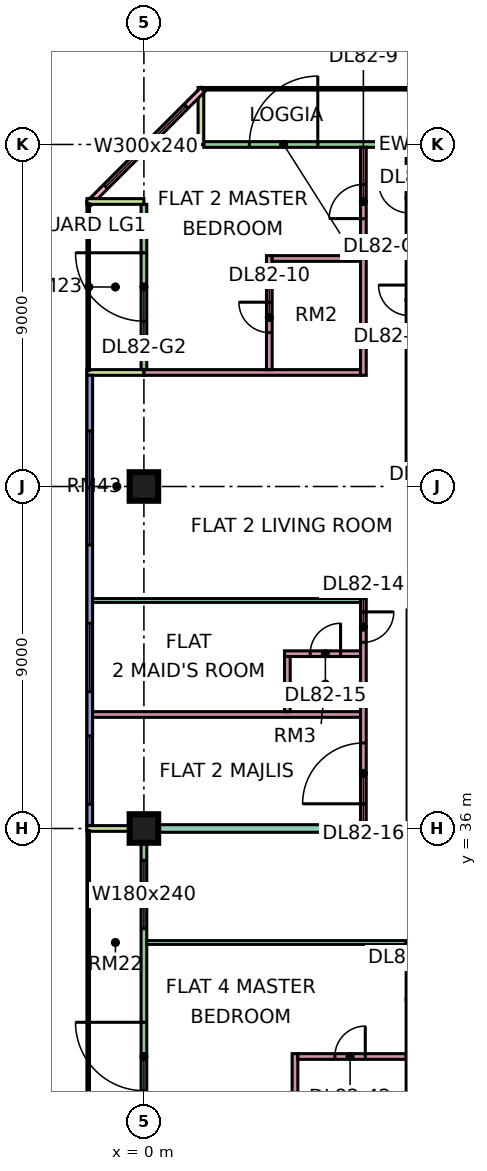
"""IFC4 building model, lengths in metres.
Left out: names, types, materials, properties, quantities, classifications, styles, units other than length and angle.
Written with IfcOpenShell. Run it as: python <this file> out.ifc"""

import sys

from ifc_helpers import new_model, si_unit, direction, frame, frame_2d, origin, origin_2d, place, context, subcontext, project, spatial, rectangle, extrude, element, fill, save


model = new_model("IFC4")
c1 = context("Model", 3, precision=1e-05, world=origin(), true_north=direction((0.0, 1.0)))
c2 = subcontext(c1, "Body", "Model", "MODEL_VIEW")
j1 = project(units=[si_unit("LENGTHUNIT", "METRE"), si_unit("PLANEANGLEUNIT", "RADIAN")], contexts=[c1])
p1 = place(None, origin())
s1 = spatial("IfcSite", under=j1, at=p1, CompositionType="ELEMENT")
p2 = place(p1, origin())
s2 = spatial("IfcBuilding", under=s1, at=p2, CompositionType="ELEMENT")
p3 = place(p2, frame((0.0, 0.0, 353.9)))
s3 = spatial("IfcBuildingStorey", under=s2, at=p3, CompositionType="ELEMENT", Elevation=353.9)
p4 = place(p3, frame((0.0, 36.0, 0.0), z_axis=(0.0, 0.0, 1.0), x_axis=(1.0, 0.0, 0.0)))
e1 = element("IfcColumn", 1, at=p4, inside=s3, PredefinedType="COLUMN", context=c2, shape_type="SweptSolid", body=[
    extrude(rectangle(XDim=0.75, YDim=0.75, at=origin_2d()), origin(), (0.0, 0.0, 1.0), 3.75),
])
p5 = place(p3, frame((0.0, 45.0, 0.0), z_axis=(0.0, 0.0, 1.0), x_axis=(1.0, 0.0, 0.0)))
e2 = element("IfcColumn", 2, at=p5, inside=s3, PredefinedType="COLUMN", context=c2, shape_type="SweptSolid", body=[
    extrude(rectangle(XDim=0.75, YDim=0.75, at=origin_2d()), origin(), (0.0, 0.0, 1.0), 3.75),
])
p6 = place(p3, frame((11.925, 54.0, 0.0), z_axis=(0.0, 0.0, 1.0), x_axis=(-1.0, 0.0, 0.0)))
e3 = element("IfcWall", 3, at=p6, inside=s3, PredefinedType="SOLIDWALL", context=c2, shape_type="SweptSolid", body=[
    extrude(rectangle(XDim=10.35, YDim=0.15, at=frame_2d((5.175, 0.0))), origin(), (0.0, 0.0, 1.0), 3.35),
])
p7 = place(p6, frame((2.075, 0.0, 1.7)))
e4 = element("IfcOpeningElement", 4, at=p7, cuts=e3, PredefinedType="OPENING", context=c2, shape_type="SweptSolid", body=[
    extrude(rectangle(XDim=1.2, YDim=0.9, at=frame_2d((0.6, 0.45))), frame((0.0, 0.085, 0.0), z_axis=(0.0, -1.0, 0.0), x_axis=(1.0, 0.0, 0.0)), (0.0, 0.0, 1.0), 0.17),
])
p8 = place(p6, frame((7.35, 0.0, 0.0)))
e5 = element("IfcOpeningElement", 5, at=p8, cuts=e3, PredefinedType="OPENING", context=c2, shape_type="SweptSolid", body=[
    extrude(rectangle(XDim=1.8, YDim=2.4, at=frame_2d((0.9, 1.2))), frame((0.0, 0.085, 0.0), z_axis=(0.0, -1.0, 0.0), x_axis=(1.0, 0.0, 0.0)), (0.0, 0.0, 1.0), 0.17),
])
p9 = place(p3, frame((1.5, 55.5, 0.0), z_axis=(0.0, 0.0, 1.0), x_axis=(0.0, -1.0, 0.0)))
e6 = element("IfcWall", 6, at=p9, inside=s3, PredefinedType="SOLIDWALL", context=c2, shape_type="SweptSolid", body=[
    extrude(rectangle(XDim=1.5, YDim=0.15, at=frame_2d((0.75, 0.0))), origin(), (0.0, 0.0, 1.0), 3.35),
])
p10 = place(p3, frame((1.553, 55.447, 0.0), z_axis=(0.0, 0.0, 1.0), x_axis=(-0.707106781187, -0.707106781187, 0.0)))
e7 = element("IfcWall", 7, at=p10, inside=s3, PredefinedType="SOLIDWALL", context=c2, shape_type="SweptSolid", body=[
    extrude(rectangle(XDim=4.243, YDim=0.15, at=frame_2d((2.121, 0.0))), origin(), (0.0, 0.0, 1.0), 3.35),
])
p11 = place(p10, frame((0.621, 0.0, 0.45)))
e8 = element("IfcOpeningElement", 8, at=p11, cuts=e7, PredefinedType="OPENING", context=c2, shape_type="SweptSolid", body=[
    extrude(rectangle(XDim=3.0, YDim=2.4, at=frame_2d((1.5, 1.2))), frame((0.0, 0.085, 0.0), z_axis=(0.0, -1.0, 0.0), x_axis=(1.0, 0.0, 0.0)), (0.0, 0.0, 1.0), 0.17),
])
p12 = place(p3, frame((0.0, 52.425, 0.0), z_axis=(0.0, 0.0, 1.0), x_axis=(0.0, -1.0, 0.0)))
e9 = element("IfcWall", 9, at=p12, inside=s3, PredefinedType="SOLIDWALL", context=c2, shape_type="SweptSolid", body=[
    extrude(rectangle(XDim=4.35, YDim=0.15, at=frame_2d((2.175, 0.0))), origin(), (0.0, 0.0, 1.0), 3.35),
])
p13 = place(p12, frame((1.275, 0.0, 0.0)))
e10 = element("IfcOpeningElement", 10, at=p13, cuts=e9, PredefinedType="OPENING", context=c2, shape_type="SweptSolid", body=[
    extrude(rectangle(XDim=1.8, YDim=2.4, at=frame_2d((0.9, 1.2))), frame((0.0, 0.085, 0.0), z_axis=(0.0, -1.0, 0.0), x_axis=(1.0, 0.0, 0.0)), (0.0, 0.0, 1.0), 0.17),
])
for number, where, z_axis, x_axis in (
    (11, (-1.5, 52.5, 0.0), (0.0, 0.0, 1.0), (1.0, 0.0, 0.0)),
    (12, (-1.5, 48.0, 0.0), (0.0, 0.0, 1.0), (1.0, 0.0, 0.0)),
):
    element("IfcWall", number, at=place(p3, frame(where, z_axis=z_axis, x_axis=x_axis)), inside=s3, PredefinedType="SOLIDWALL", context=c2, shape_type="SweptSolid", body=[
        extrude(rectangle(XDim=1.5, YDim=0.15, at=frame_2d((0.75, 0.0))), origin(), (0.0, 0.0, 1.0), 3.35),
    ])
p14 = place(p3, frame((-1.425, 47.925, 0.0), z_axis=(0.0, 0.0, 1.0), x_axis=(0.0, -1.0, 0.0)))
e13 = element("IfcWall", 13, at=p14, inside=s3, PredefinedType="SOLIDWALL", context=c2, shape_type="SweptSolid", body=[
    extrude(rectangle(XDim=11.85, YDim=0.15, at=frame_2d((5.925, 0.0))), origin(), (0.0, 0.0, 1.0), 3.35),
])
p15 = place(p14, frame((1.462, 0.0, 0.45)))
e14 = element("IfcOpeningElement", 14, at=p15, cuts=e13, PredefinedType="OPENING", context=c2, shape_type="SweptSolid", body=[
    extrude(rectangle(XDim=3.0, YDim=2.4, at=frame_2d((1.5, 1.2))), frame((0.0, 0.085, 0.0), z_axis=(0.0, -1.0, 0.0), x_axis=(1.0, 0.0, 0.0)), (0.0, 0.0, 1.0), 0.17),
])
p16 = place(p14, frame((6.525, 0.0, 0.45)))
e15 = element("IfcOpeningElement", 15, at=p16, cuts=e13, PredefinedType="OPENING", context=c2, shape_type="SweptSolid", body=[
    extrude(rectangle(XDim=1.8, YDim=2.4, at=frame_2d((0.9, 1.2))), frame((0.0, 0.085, 0.0), z_axis=(0.0, -1.0, 0.0), x_axis=(1.0, 0.0, 0.0)), (0.0, 0.0, 1.0), 0.17),
])
p17 = place(p14, frame((9.488, 0.0, 0.45)))
e16 = element("IfcOpeningElement", 16, at=p17, cuts=e13, PredefinedType="OPENING", context=c2, shape_type="SweptSolid", body=[
    extrude(rectangle(XDim=1.8, YDim=2.4, at=frame_2d((0.9, 1.2))), frame((0.0, 0.085, 0.0), z_axis=(0.0, -1.0, 0.0), x_axis=(1.0, 0.0, 0.0)), (0.0, 0.0, 1.0), 0.17),
])
p18 = place(p3, frame((0.0, 35.925, 0.0), z_axis=(0.0, 0.0, 1.0), x_axis=(0.0, -1.0, 0.0)))
e17 = element("IfcWall", 17, at=p18, inside=s3, PredefinedType="SOLIDWALL", context=c2, shape_type="SweptSolid", body=[
    extrude(rectangle(XDim=11.85, YDim=0.15, at=frame_2d((5.925, 0.0))), origin(), (0.0, 0.0, 1.0), 3.35),
])
p19 = place(p18, frame((0.762, 0.0, 0.45)))
e18 = element("IfcOpeningElement", 18, at=p19, cuts=e17, PredefinedType="OPENING", context=c2, shape_type="SweptSolid", body=[
    extrude(rectangle(XDim=1.8, YDim=2.4, at=frame_2d((0.9, 1.2))), frame((0.0, 0.085, 0.0), z_axis=(0.0, -1.0, 0.0), x_axis=(1.0, 0.0, 0.0)), (0.0, 0.0, 1.0), 0.17),
])
p20 = place(p18, frame((5.025, 0.0, 0.0)))
e19 = element("IfcOpeningElement", 19, at=p20, cuts=e17, PredefinedType="OPENING", context=c2, shape_type="SweptSolid", body=[
    extrude(rectangle(XDim=1.8, YDim=2.4, at=frame_2d((0.9, 1.2))), frame((0.0, 0.085, 0.0), z_axis=(0.0, -1.0, 0.0), x_axis=(1.0, 0.0, 0.0)), (0.0, 0.0, 1.0), 0.17),
])
p21 = place(p18, frame((9.288, 0.0, 0.45)))
e20 = element("IfcOpeningElement", 20, at=p21, cuts=e17, PredefinedType="OPENING", context=c2, shape_type="SweptSolid", body=[
    extrude(rectangle(XDim=1.8, YDim=2.4, at=frame_2d((0.9, 1.2))), frame((0.0, 0.085, 0.0), z_axis=(0.0, -1.0, 0.0), x_axis=(1.0, 0.0, 0.0)), (0.0, 0.0, 1.0), 0.17),
])
p22 = place(p3, frame((-1.5, 36.0, 0.0), z_axis=(0.0, 0.0, 1.0), x_axis=(1.0, 0.0, 0.0)))
e21 = element("IfcWall", 21, at=p22, inside=s3, PredefinedType="SOLIDWALL", context=c2, shape_type="SweptSolid", body=[
    extrude(rectangle(XDim=1.5, YDim=0.15, at=frame_2d((0.75, 0.0))), origin(), (0.0, 0.0, 1.0), 3.35),
])
p23 = place(p3, frame((-1.351, 39.0, 0.0), z_axis=(0.0, 0.0, 1.0), x_axis=(1.0, 0.0, 0.0)))
e22 = element("IfcWall", 22, at=p23, inside=s3, PredefinedType="PARTITIONING", context=c2, shape_type="SweptSolid", body=[
    extrude(rectangle(XDim=7.051, YDim=0.15, at=frame_2d((3.525, 0.0))), origin(), (0.0, 0.0, 1.0), 3.35),
])
e23 = element("IfcWall", 23, at=p4, inside=s3, PredefinedType="PARTITIONING", context=c2, shape_type="SweptSolid", body=[
    extrude(rectangle(XDim=12.275, YDim=0.2, at=frame_2d((6.137, 0.0))), origin(), (0.0, 0.0, 1.0), 3.35),
])
p24 = place(p3, frame((-1.35, 42.0, 0.0), z_axis=(0.0, 0.0, 1.0), x_axis=(1.0, 0.0, 0.0)))
e24 = element("IfcWall", 24, at=p24, inside=s3, PredefinedType="PARTITIONING", context=c2, shape_type="SweptSolid", body=[
    extrude(rectangle(XDim=7.05, YDim=0.1, at=frame_2d((3.525, 0.0))), origin(), (0.0, 0.0, 1.0), 3.35),
])
p25 = place(p3, frame((0.0, 48.0, 0.0), z_axis=(0.0, 0.0, 1.0), x_axis=(1.0, 0.0, 0.0)))
e25 = element("IfcWall", 25, at=p25, inside=s3, PredefinedType="PARTITIONING", context=c2, shape_type="SweptSolid", body=[
    extrude(rectangle(XDim=5.7, YDim=0.15, at=frame_2d((2.85, 0.0))), origin(), (0.0, 0.0, 1.0), 3.35),
])
p26 = place(p3, frame((0.074, 33.0, 0.0), z_axis=(0.0, 0.0, 1.0), x_axis=(1.0, 0.0, 0.0)))
e26 = element("IfcWall", 26, at=p26, inside=s3, PredefinedType="PARTITIONING", context=c2, shape_type="SweptSolid", body=[
    extrude(rectangle(XDim=6.826, YDim=0.1, at=frame_2d((3.413, 0.0))), origin(), (0.0, 0.0, 1.0), 3.35),
])
p27 = place(p3, frame((3.3, 48.075, 0.0), z_axis=(0.0, 0.0, 1.0), x_axis=(0.0, 1.0, 0.0)))
e27 = element("IfcWall", 27, at=p27, inside=s3, PredefinedType="PARTITIONING", context=c2, shape_type="SweptSolid", body=[
    extrude(rectangle(XDim=3.0, YDim=0.15, at=frame_2d((1.5, 0.0))), origin(), (0.0, 0.0, 1.0), 3.35),
])
p28 = place(p27, frame((0.975, 0.0, 0.0)))
e28 = element("IfcOpeningElement", 28, at=p28, cuts=e27, PredefinedType="OPENING", context=c2, shape_type="SweptSolid", body=[
    extrude(rectangle(XDim=0.8, YDim=2.1, at=frame_2d((0.4, 1.05))), frame((0.0, 0.085, 0.0), z_axis=(0.0, -1.0, 0.0), x_axis=(1.0, 0.0, 0.0)), (0.0, 0.0, 1.0), 0.17),
])
p29 = place(p3, frame((3.375, 51.0, 0.0), z_axis=(0.0, 0.0, 1.0), x_axis=(1.0, 0.0, 0.0)))
e29 = element("IfcWall", 29, at=p29, inside=s3, PredefinedType="PARTITIONING", context=c2, shape_type="SweptSolid", body=[
    extrude(rectangle(XDim=2.325, YDim=0.15, at=frame_2d((1.163, 0.0))), origin(), (0.0, 0.0, 1.0), 3.35),
])
p30 = place(p3, frame((3.7, 40.6, 0.0), z_axis=(0.0, 0.0, 1.0), x_axis=(1.0, 0.0, 0.0)))
e30 = element("IfcWall", 30, at=p30, inside=s3, PredefinedType="PARTITIONING", context=c2, shape_type="SweptSolid", body=[
    extrude(rectangle(XDim=2.0, YDim=0.15, at=frame_2d((1.0, 0.0))), origin(), (0.0, 0.0, 1.0), 3.35),
])
p31 = place(p30, frame((0.675, 0.0, 0.0)))
e31 = element("IfcOpeningElement", 31, at=p31, cuts=e30, PredefinedType="OPENING", context=c2, shape_type="SweptSolid", body=[
    extrude(rectangle(XDim=0.8, YDim=2.1, at=frame_2d((0.4, 1.05))), frame((0.0, 0.085, 0.0), z_axis=(0.0, -1.0, 0.0), x_axis=(1.0, 0.0, 0.0)), (0.0, 0.0, 1.0), 0.17),
])
p32 = place(p3, frame((3.775, 39.075, 0.0), z_axis=(0.0, 0.0, 1.0), x_axis=(0.0, 1.0, 0.0)))
e32 = element("IfcWall", 32, at=p32, inside=s3, PredefinedType="PARTITIONING", context=c2, shape_type="SweptSolid", body=[
    extrude(rectangle(XDim=1.45, YDim=0.15, at=frame_2d((0.725, 0.0))), origin(), (0.0, 0.0, 1.0), 3.35),
])
p33 = place(p3, frame((3.975, 27.075, 0.0), z_axis=(0.0, 0.0, 1.0), x_axis=(0.0, 1.0, 0.0)))
e33 = element("IfcWall", 33, at=p33, inside=s3, PredefinedType="PARTITIONING", context=c2, shape_type="SweptSolid", body=[
    extrude(rectangle(XDim=3.0, YDim=0.15, at=frame_2d((1.5, 0.0))), origin(), (0.0, 0.0, 1.0), 3.35),
])
p34 = place(p3, frame((4.05, 30.0, 0.0), z_axis=(0.0, 0.0, 1.0), x_axis=(1.0, 0.0, 0.0)))
e34 = element("IfcWall", 34, at=p34, inside=s3, PredefinedType="PARTITIONING", context=c2, shape_type="SweptSolid", body=[
    extrude(rectangle(XDim=2.85, YDim=0.15, at=frame_2d((1.425, 0.0))), origin(), (0.0, 0.0, 1.0), 3.35),
])
p35 = place(p34, frame((0.975, 0.0, 0.0)))
e35 = element("IfcOpeningElement", 35, at=p35, cuts=e34, PredefinedType="OPENING", context=c2, shape_type="SweptSolid", body=[
    extrude(rectangle(XDim=0.8, YDim=2.1, at=frame_2d((0.4, 1.05))), frame((0.0, 0.085, 0.0), z_axis=(0.0, -1.0, 0.0), x_axis=(1.0, 0.0, 0.0)), (0.0, 0.0, 1.0), 0.17),
])
p36 = place(p3, frame((5.775, 36.1, 0.0), z_axis=(0.0, 0.0, 1.0), x_axis=(0.0, 1.0, 0.0)))
e36 = element("IfcWall", 36, at=p36, inside=s3, PredefinedType="PARTITIONING", context=c2, shape_type="SweptSolid", body=[
    extrude(rectangle(XDim=5.95, YDim=0.15, at=frame_2d((2.975, 0.0))), origin(), (0.0, 0.0, 1.0), 3.35),
])
p37 = place(p36, frame((4.8, 0.0, 0.0)))
e37 = element("IfcOpeningElement", 37, at=p37, cuts=e36, PredefinedType="OPENING", context=c2, shape_type="SweptSolid", body=[
    extrude(rectangle(XDim=0.8, YDim=2.1, at=frame_2d((0.4, 1.05))), frame((0.0, 0.085, 0.0), z_axis=(0.0, -1.0, 0.0), x_axis=(1.0, 0.0, 0.0)), (0.0, 0.0, 1.0), 0.17),
])
p38 = place(p36, frame((0.55, 0.0, 0.0)))
e38 = element("IfcOpeningElement", 38, at=p38, cuts=e36, PredefinedType="OPENING", context=c2, shape_type="SweptSolid", body=[
    extrude(rectangle(XDim=1.6, YDim=2.1, at=frame_2d((0.8, 1.05))), frame((0.0, 0.085, 0.0), z_axis=(0.0, -1.0, 0.0), x_axis=(1.0, 0.0, 0.0)), (0.0, 0.0, 1.0), 0.17),
])
p39 = place(p3, frame((5.775, 47.925, 0.0), z_axis=(0.0, 0.0, 1.0), x_axis=(0.0, 1.0, 0.0)))
e39 = element("IfcWall", 39, at=p39, inside=s3, PredefinedType="PARTITIONING", context=c2, shape_type="SweptSolid", body=[
    extrude(rectangle(XDim=6.001, YDim=0.15, at=frame_2d((3.0, 0.0))), origin(), (0.0, 0.0, 1.0), 3.35),
])
p40 = place(p39, frame((4.125, 0.0, 0.0)))
e40 = element("IfcOpeningElement", 40, at=p40, cuts=e39, PredefinedType="OPENING", context=c2, shape_type="SweptSolid", body=[
    extrude(rectangle(XDim=0.9, YDim=2.1, at=frame_2d((0.45, 1.05))), frame((0.0, 0.085, 0.0), z_axis=(0.0, -1.0, 0.0), x_axis=(1.0, 0.0, 0.0)), (0.0, 0.0, 1.0), 0.17),
])
p41 = place(p3, frame((6.975, 22.5, 0.0), z_axis=(0.0, 0.0, 1.0), x_axis=(0.0, 1.0, 0.0)))
e41 = element("IfcWall", 41, at=p41, inside=s3, PredefinedType="PARTITIONING", context=c2, shape_type="SweptSolid", body=[
    extrude(rectangle(XDim=10.55, YDim=0.15, at=frame_2d((5.275, 0.0))), origin(), (0.0, 0.0, 1.0), 3.35),
])
p42 = place(p41, frame((1.8, 0.0, 0.0)))
e42 = element("IfcOpeningElement", 42, at=p42, cuts=e41, PredefinedType="OPENING", context=c2, shape_type="SweptSolid", body=[
    extrude(rectangle(XDim=0.9, YDim=2.1, at=frame_2d((0.45, 1.05))), frame((0.0, 0.085, 0.0), z_axis=(0.0, -1.0, 0.0), x_axis=(1.0, 0.0, 0.0)), (0.0, 0.0, 1.0), 0.17),
])
p43 = place(p41, frame((8.55, 0.0, 0.0)))
e43 = element("IfcOpeningElement", 43, at=p43, cuts=e41, PredefinedType="OPENING", context=c2, shape_type="SweptSolid", body=[
    extrude(rectangle(XDim=0.9, YDim=2.1, at=frame_2d((0.45, 1.05))), frame((0.0, 0.085, 0.0), z_axis=(0.0, -1.0, 0.0), x_axis=(1.0, 0.0, 0.0)), (0.0, 0.0, 1.0), 0.17),
])
p44 = place(p3, frame((6.975, 45.225, 0.0), z_axis=(0.0, 0.0, 1.0), x_axis=(0.0, 1.0, 0.0)))
e44 = element("IfcWall", 44, at=p44, inside=s3, PredefinedType="PARTITIONING", context=c2, shape_type="SweptSolid", body=[
    extrude(rectangle(XDim=8.701, YDim=0.15, at=frame_2d((4.351, 0.0))), origin(), (0.0, 0.0, 1.0), 3.35),
])
p45 = place(p44, frame((4.275, 0.0, 0.0)))
e45 = element("IfcOpeningElement", 45, at=p45, cuts=e44, PredefinedType="OPENING", context=c2, shape_type="SweptSolid", body=[
    extrude(rectangle(XDim=0.8, YDim=2.1, at=frame_2d((0.4, 1.05))), frame((0.0, 0.085, 0.0), z_axis=(0.0, -1.0, 0.0), x_axis=(1.0, 0.0, 0.0)), (0.0, 0.0, 1.0), 0.17),
])
p46 = place(p44, frame((6.975, 0.0, 0.0)))
e46 = element("IfcOpeningElement", 46, at=p46, cuts=e44, PredefinedType="OPENING", context=c2, shape_type="SweptSolid", body=[
    extrude(rectangle(XDim=0.8, YDim=2.1, at=frame_2d((0.4, 1.05))), frame((0.0, 0.085, 0.0), z_axis=(0.0, -1.0, 0.0), x_axis=(1.0, 0.0, 0.0)), (0.0, 0.0, 1.0), 0.17),
])
p47 = place(p8, frame((1.8, 0.0, 0.0), z_axis=(0.0, 0.0, 1.0), x_axis=(-1.0, 0.0, 0.0)))
e47 = element("IfcDoor", 47, at=p47, inside=s3, OperationType="DOUBLE_DOOR_SINGLE_SWING", PredefinedType="DOOR", context=c2, shape_type="SweptSolid", body=[
    extrude(rectangle(XDim=1.8, YDim=2.4, at=frame_2d((0.9, 1.2))), frame((0.0, 0.025, 0.0), z_axis=(0.0, -1.0, 0.0), x_axis=(1.0, 0.0, 0.0)), (0.0, 0.0, 1.0), 0.05),
])
fill(e5, e47)
p48 = place(p11, origin())
e48 = element("IfcWindow", 48, at=p48, inside=s3, PartitioningType="SINGLE_PANEL", PredefinedType="WINDOW", context=c2, shape_type="SweptSolid", body=[
    extrude(rectangle(XDim=3.0, YDim=2.4, at=frame_2d((1.5, 1.2))), frame((0.0, 0.03, 0.0), z_axis=(0.0, -1.0, 0.0), x_axis=(1.0, 0.0, 0.0)), (0.0, 0.0, 1.0), 0.06),
])
fill(e8, e48)
p49 = place(p13, frame((1.8, 0.0, 0.0), z_axis=(0.0, 0.0, 1.0), x_axis=(-1.0, 0.0, 0.0)))
e49 = element("IfcDoor", 49, at=p49, inside=s3, OperationType="DOUBLE_DOOR_SINGLE_SWING", PredefinedType="DOOR", context=c2, shape_type="SweptSolid", body=[
    extrude(rectangle(XDim=1.8, YDim=2.4, at=frame_2d((0.9, 1.2))), frame((0.0, 0.025, 0.0), z_axis=(0.0, -1.0, 0.0), x_axis=(1.0, 0.0, 0.0)), (0.0, 0.0, 1.0), 0.05),
])
fill(e10, e49)
p50 = place(p15, origin())
e50 = element("IfcWindow", 50, at=p50, inside=s3, PartitioningType="SINGLE_PANEL", PredefinedType="WINDOW", context=c2, shape_type="SweptSolid", body=[
    extrude(rectangle(XDim=3.0, YDim=2.4, at=frame_2d((1.5, 1.2))), frame((0.0, 0.03, 0.0), z_axis=(0.0, -1.0, 0.0), x_axis=(1.0, 0.0, 0.0)), (0.0, 0.0, 1.0), 0.06),
])
fill(e14, e50)
p51 = place(p16, origin())
e51 = element("IfcWindow", 51, at=p51, inside=s3, PartitioningType="SINGLE_PANEL", PredefinedType="WINDOW", context=c2, shape_type="SweptSolid", body=[
    extrude(rectangle(XDim=1.8, YDim=2.4, at=frame_2d((0.9, 1.2))), frame((0.0, 0.03, 0.0), z_axis=(0.0, -1.0, 0.0), x_axis=(1.0, 0.0, 0.0)), (0.0, 0.0, 1.0), 0.06),
])
fill(e15, e51)
p52 = place(p17, origin())
e52 = element("IfcWindow", 52, at=p52, inside=s3, PartitioningType="SINGLE_PANEL", PredefinedType="WINDOW", context=c2, shape_type="SweptSolid", body=[
    extrude(rectangle(XDim=1.8, YDim=2.4, at=frame_2d((0.9, 1.2))), frame((0.0, 0.03, 0.0), z_axis=(0.0, -1.0, 0.0), x_axis=(1.0, 0.0, 0.0)), (0.0, 0.0, 1.0), 0.06),
])
fill(e16, e52)
p53 = place(p19, origin())
e53 = element("IfcWindow", 53, at=p53, inside=s3, PartitioningType="SINGLE_PANEL", PredefinedType="WINDOW", context=c2, shape_type="SweptSolid", body=[
    extrude(rectangle(XDim=1.8, YDim=2.4, at=frame_2d((0.9, 1.2))), frame((0.0, 0.03, 0.0), z_axis=(0.0, -1.0, 0.0), x_axis=(1.0, 0.0, 0.0)), (0.0, 0.0, 1.0), 0.06),
])
fill(e18, e53)
p54 = place(p20, frame((1.8, 0.0, 0.0), z_axis=(0.0, 0.0, 1.0), x_axis=(-1.0, 0.0, 0.0)))
e54 = element("IfcDoor", 54, at=p54, inside=s3, OperationType="DOUBLE_DOOR_SINGLE_SWING", PredefinedType="DOOR", context=c2, shape_type="SweptSolid", body=[
    extrude(rectangle(XDim=1.8, YDim=2.4, at=frame_2d((0.9, 1.2))), frame((0.0, 0.025, 0.0), z_axis=(0.0, -1.0, 0.0), x_axis=(1.0, 0.0, 0.0)), (0.0, 0.0, 1.0), 0.05),
])
fill(e19, e54)
p55 = place(p40, origin())
e55 = element("IfcDoor", 55, at=p55, inside=s3, OperationType="SINGLE_SWING_LEFT", PredefinedType="DOOR", context=c2, shape_type="SweptSolid", body=[
    extrude(rectangle(XDim=0.9, YDim=2.1, at=frame_2d((0.45, 1.05))), frame((0.0, 0.025, 0.0), z_axis=(0.0, -1.0, 0.0), x_axis=(1.0, 0.0, 0.0)), (0.0, 0.0, 1.0), 0.05),
])
fill(e40, e55)
p56 = place(p28, frame((0.8, 0.0, 0.0), z_axis=(0.0, 0.0, 1.0), x_axis=(-1.0, 0.0, 0.0)))
e56 = element("IfcDoor", 56, at=p56, inside=s3, OperationType="SINGLE_SWING_RIGHT", PredefinedType="DOOR", context=c2, shape_type="SweptSolid", body=[
    extrude(rectangle(XDim=0.8, YDim=2.1, at=frame_2d((0.4, 1.05))), frame((0.0, 0.025, 0.0), z_axis=(0.0, -1.0, 0.0), x_axis=(1.0, 0.0, 0.0)), (0.0, 0.0, 1.0), 0.05),
])
fill(e28, e56)
p57 = place(p37, origin())
e57 = element("IfcDoor", 57, at=p57, inside=s3, OperationType="SINGLE_SWING_RIGHT", PredefinedType="DOOR", context=c2, shape_type="SweptSolid", body=[
    extrude(rectangle(XDim=0.8, YDim=2.1, at=frame_2d((0.4, 1.05))), frame((0.0, 0.025, 0.0), z_axis=(0.0, -1.0, 0.0), x_axis=(1.0, 0.0, 0.0)), (0.0, 0.0, 1.0), 0.05),
])
fill(e37, e57)
p58 = place(p31, frame((0.8, 0.0, 0.0), z_axis=(0.0, 0.0, 1.0), x_axis=(-1.0, 0.0, 0.0)))
e58 = element("IfcDoor", 58, at=p58, inside=s3, OperationType="SINGLE_SWING_RIGHT", PredefinedType="DOOR", context=c2, shape_type="SweptSolid", body=[
    extrude(rectangle(XDim=0.8, YDim=2.1, at=frame_2d((0.4, 1.05))), frame((0.0, 0.025, 0.0), z_axis=(0.0, -1.0, 0.0), x_axis=(1.0, 0.0, 0.0)), (0.0, 0.0, 1.0), 0.05),
])
fill(e31, e58)
p59 = place(p38, origin())
e59 = element("IfcDoor", 59, at=p59, inside=s3, OperationType="DOUBLE_DOOR_SINGLE_SWING", PredefinedType="DOOR", context=c2, shape_type="SweptSolid", body=[
    extrude(rectangle(XDim=1.6, YDim=2.1, at=frame_2d((0.8, 1.05))), frame((0.0, 0.025, 0.0), z_axis=(0.0, -1.0, 0.0), x_axis=(1.0, 0.0, 0.0)), (0.0, 0.0, 1.0), 0.05),
])
fill(e38, e59)
p60 = place(p35, frame((0.8, 0.0, 0.0), z_axis=(0.0, 0.0, 1.0), x_axis=(-1.0, 0.0, 0.0)))
e60 = element("IfcDoor", 60, at=p60, inside=s3, OperationType="SINGLE_SWING_RIGHT", PredefinedType="DOOR", context=c2, shape_type="SweptSolid", body=[
    extrude(rectangle(XDim=0.8, YDim=2.1, at=frame_2d((0.4, 1.05))), frame((0.0, 0.025, 0.0), z_axis=(0.0, -1.0, 0.0), x_axis=(1.0, 0.0, 0.0)), (0.0, 0.0, 1.0), 0.05),
])
fill(e35, e60)
save(model, sys.argv[1])
